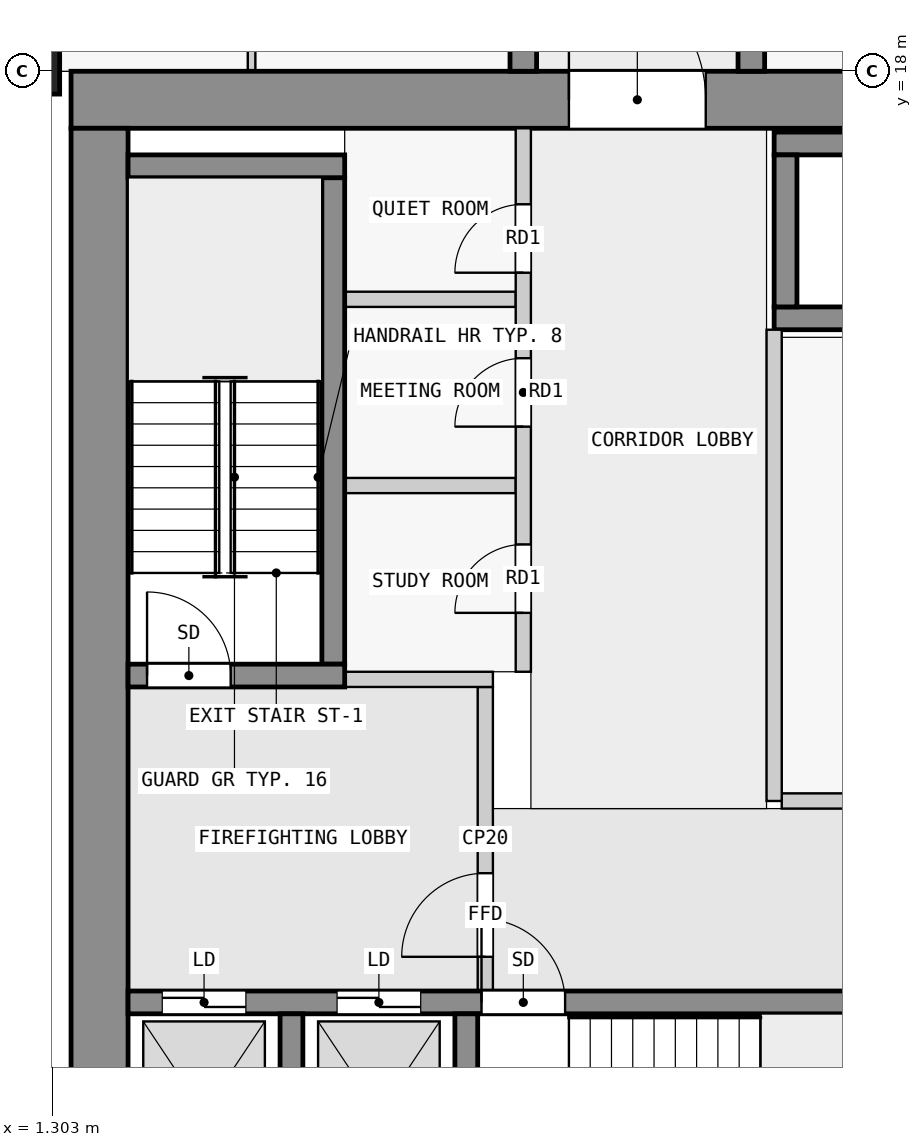
"""IFC4 building model, lengths in metres.
Left out: names, types, materials, properties, quantities, classifications, styles, units other than length and angle.
Written with IfcOpenShell. Run it as: python <this file> out.ifc"""

import sys

from ifc_helpers import new_model, si_unit, direction, frame, frame_2d, origin, origin_2d, place, context, subcontext, project, spatial, rectangle, extrude, element, fill, save


model = new_model("IFC4")
c1 = context("Model", 3, precision=1e-05, world=origin(), true_north=direction((0.0, 1.0)))
c2 = subcontext(c1, "Body", "Model", "MODEL_VIEW")
j1 = project(units=[si_unit("LENGTHUNIT", "METRE"), si_unit("PLANEANGLEUNIT", "RADIAN")], contexts=[c1])
p1 = place(None, origin())
s1 = spatial("IfcSite", under=j1, at=p1, CompositionType="ELEMENT")
p2 = place(p1, origin())
s2 = spatial("IfcBuilding", under=s1, at=p2, CompositionType="ELEMENT")
p3 = place(p2, frame((0.0, 0.0, 44.3)))
s3 = spatial("IfcBuildingStorey", under=s2, at=p3, CompositionType="ELEMENT", Elevation=44.3)
p4 = place(p3, frame((0.7, 18.0, 0.0), z_axis=(0.0, 0.0, 1.0), x_axis=(0.0, 1.0, 0.0)))
e1 = element("IfcColumn", 1, at=p4, inside=s3, PredefinedType="COLUMN", context=c2, shape_type="SweptSolid", body=[
    extrude(rectangle(XDim=0.6, YDim=1.4, at=origin_2d()), origin(), (0.0, 0.0, 1.0), 3.5),
])
p5 = place(p3, frame((1.55, 17.625, 0.0), z_axis=(0.0, 0.0, 1.0), x_axis=(1.0, 0.0, 0.0)))
e2 = element("IfcWall", 2, at=p5, inside=s3, PredefinedType="SHEAR", context=c2, shape_type="SweptSolid", body=[
    extrude(rectangle(XDim=20.95, YDim=0.75, at=frame_2d((10.475, 0.0))), origin(), (0.0, 0.0, 1.0), 3.25),
])
p6 = place(p5, frame((6.55, 0.0, 0.0)))
e3 = element("IfcOpeningElement", 3, at=p6, cuts=e2, PredefinedType="OPENING", context=c2, shape_type="SweptSolid", body=[
    extrude(rectangle(XDim=1.8, YDim=2.1, at=frame_2d((0.9, 1.05))), frame((0.0, 0.385, 0.0), z_axis=(0.0, -1.0, 0.0), x_axis=(1.0, 0.0, 0.0)), (0.0, 0.0, 1.0), 0.77),
])
p7 = place(p3, frame((1.925, 2.5, 0.0), z_axis=(0.0, 0.0, 1.0), x_axis=(0.0, 1.0, 0.0)))
e4 = element("IfcWall", 4, at=p7, inside=s3, PredefinedType="SHEAR", context=c2, shape_type="SweptSolid", body=[
    extrude(rectangle(XDim=14.75, YDim=0.75, at=frame_2d((7.375, 0.0))), origin(), (0.0, 0.0, 1.0), 3.25),
])
for number, where, z_axis, x_axis in (
    (5, (4.45, 2.8, 0.0), (0.0, 0.0, 1.0), (0.0, 1.0, 0.0)),
    (6, (6.75, 2.8, 0.0), (0.0, 0.0, 1.0), (0.0, 1.0, 0.0)),
):
    element("IfcWall", number, at=place(p3, frame(where, z_axis=z_axis, x_axis=x_axis)), inside=s3, PredefinedType="SHEAR", context=c2, shape_type="SweptSolid", body=[
        extrude(rectangle(XDim=2.8, YDim=0.3, at=frame_2d((1.4, 0.0))), origin(), (0.0, 0.0, 1.0), 3.25),
    ])
p8 = place(p3, frame((2.3, 5.75, 0.0), z_axis=(0.0, 0.0, 1.0), x_axis=(1.0, 0.0, 0.0)))
e7 = element("IfcWall", 7, at=p8, inside=s3, PredefinedType="SHEAR", context=c2, shape_type="SweptSolid", body=[
    extrude(rectangle(XDim=18.8, YDim=0.3, at=frame_2d((9.4, 0.0))), origin(), (0.0, 0.0, 1.0), 3.25),
])
p9 = place(p8, frame((4.65, 0.0, 0.0)))
e8 = element("IfcOpeningElement", 8, at=p9, cuts=e7, PredefinedType="OPENING", context=c2, shape_type="SweptSolid", body=[
    extrude(rectangle(XDim=1.1, YDim=2.1, at=frame_2d((0.55, 1.05))), frame((0.0, 0.16, 0.0), z_axis=(0.0, -1.0, 0.0), x_axis=(1.0, 0.0, 0.0)), (0.0, 0.0, 1.0), 0.32),
])
p10 = place(p8, frame((0.45, 0.0, 0.0)))
e9 = element("IfcOpeningElement", 9, at=p10, cuts=e7, PredefinedType="OPENING", context=c2, shape_type="SweptSolid", body=[
    extrude(rectangle(XDim=1.1, YDim=2.1, at=frame_2d((0.55, 1.05))), frame((0.0, 0.16, 0.0), z_axis=(0.0, -1.0, 0.0), x_axis=(1.0, 0.0, 0.0)), (0.0, 0.0, 1.0), 0.32),
])
p11 = place(p8, frame((2.75, 0.0, 0.0)))
e10 = element("IfcOpeningElement", 10, at=p11, cuts=e7, PredefinedType="OPENING", context=c2, shape_type="SweptSolid", body=[
    extrude(rectangle(XDim=1.1, YDim=2.1, at=frame_2d((0.55, 1.05))), frame((0.0, 0.16, 0.0), z_axis=(0.0, -1.0, 0.0), x_axis=(1.0, 0.0, 0.0)), (0.0, 0.0, 1.0), 0.32),
])
p12 = place(p8, frame((11.85, 0.0, 0.0)))
e11 = element("IfcOpeningElement", 11, at=p12, cuts=e7, PredefinedType="OPENING", context=c2, shape_type="SweptSolid", body=[
    extrude(rectangle(XDim=1.1, YDim=2.1, at=frame_2d((0.55, 1.05))), frame((0.0, 0.16, 0.0), z_axis=(0.0, -1.0, 0.0), x_axis=(1.0, 0.0, 0.0)), (0.0, 0.0, 1.0), 0.32),
])
p13 = place(p8, frame((14.35, 0.0, 0.0)))
e12 = element("IfcOpeningElement", 12, at=p13, cuts=e7, PredefinedType="OPENING", context=c2, shape_type="SweptSolid", body=[
    extrude(rectangle(XDim=1.1, YDim=2.1, at=frame_2d((0.55, 1.05))), frame((0.0, 0.16, 0.0), z_axis=(0.0, -1.0, 0.0), x_axis=(1.0, 0.0, 0.0)), (0.0, 0.0, 1.0), 0.32),
])
p14 = place(p8, frame((16.85, 0.0, 0.0)))
e13 = element("IfcOpeningElement", 13, at=p14, cuts=e7, PredefinedType="OPENING", context=c2, shape_type="SweptSolid", body=[
    extrude(rectangle(XDim=1.1, YDim=2.1, at=frame_2d((0.55, 1.05))), frame((0.0, 0.16, 0.0), z_axis=(0.0, -1.0, 0.0), x_axis=(1.0, 0.0, 0.0)), (0.0, 0.0, 1.0), 0.32),
])
p15 = place(p3, frame((2.3, 10.05, 0.0), z_axis=(0.0, 0.0, 1.0), x_axis=(1.0, 0.0, 0.0)))
e14 = element("IfcWall", 14, at=p15, inside=s3, PredefinedType="SHEAR", context=c2, shape_type="SweptSolid", body=[
    extrude(rectangle(XDim=2.85, YDim=0.3, at=frame_2d((1.425, 0.0))), origin(), (0.0, 0.0, 1.0), 3.25),
])
p16 = place(p15, frame((0.25, 0.0, 0.0)))
e15 = element("IfcOpeningElement", 15, at=p16, cuts=e14, PredefinedType="OPENING", context=c2, shape_type="SweptSolid", body=[
    extrude(rectangle(XDim=1.1, YDim=2.1, at=frame_2d((0.55, 1.05))), frame((0.0, 0.16, 0.0), z_axis=(0.0, -1.0, 0.0), x_axis=(1.0, 0.0, 0.0)), (0.0, 0.0, 1.0), 0.32),
])
p17 = place(p3, frame((5.0, 10.2, 0.0), z_axis=(0.0, 0.0, 1.0), x_axis=(0.0, 1.0, 0.0)))
e16 = element("IfcWall", 16, at=p17, inside=s3, PredefinedType="SHEAR", context=c2, shape_type="SweptSolid", body=[
    extrude(rectangle(XDim=6.4, YDim=0.3, at=frame_2d((3.2, 0.0))), origin(), (0.0, 0.0, 1.0), 3.25),
])
p18 = place(p3, frame((2.3, 16.75, 0.0), z_axis=(0.0, 0.0, 1.0), x_axis=(1.0, 0.0, 0.0)))
e17 = element("IfcWall", 17, at=p18, inside=s3, PredefinedType="SHEAR", context=c2, shape_type="SweptSolid", body=[
    extrude(rectangle(XDim=2.85, YDim=0.3, at=frame_2d((1.425, 0.0))), origin(), (0.0, 0.0, 1.0), 3.25),
])
for number, where, z_axis, x_axis in (
    (18, (10.8, 17.05, 0.0), (0.0, 0.0, 1.0), (1.0, 0.0, 0.0)),
    (19, (10.8, 14.75, 0.0), (0.0, 0.0, 1.0), (1.0, 0.0, 0.0)),
):
    element("IfcWall", number, at=place(p3, frame(where, z_axis=z_axis, x_axis=x_axis)), inside=s3, PredefinedType="SHEAR", context=c2, shape_type="SweptSolid", body=[
        extrude(rectangle(XDim=7.8, YDim=0.3, at=frame_2d((3.9, 0.0))), origin(), (0.0, 0.0, 1.0), 3.25),
    ])
p19 = place(p3, frame((10.95, 14.9, 0.0), z_axis=(0.0, 0.0, 1.0), x_axis=(0.0, 1.0, 0.0)))
e20 = element("IfcWall", 20, at=p19, inside=s3, PredefinedType="SHEAR", context=c2, shape_type="SweptSolid", body=[
    extrude(rectangle(XDim=2.0, YDim=0.3, at=frame_2d((1.0, 0.0))), origin(), (0.0, 0.0, 1.0), 3.25),
])
p20 = place(p3, frame((7.5, 18.0, 0.0), z_axis=(0.0, 0.0, 1.0), x_axis=(0.0, 1.0, 0.0)))
e21 = element("IfcWall", 21, at=p20, inside=s3, PredefinedType="SHEAR", context=c2, shape_type="SweptSolid", body=[
    extrude(rectangle(XDim=27.0, YDim=0.35, at=frame_2d((13.5, 0.0))), origin(), (0.0, 0.0, 1.0), 3.25),
])
p21 = place(p20, frame((4.75, 0.0, 0.0)))
e22 = element("IfcOpeningElement", 22, at=p21, cuts=e21, PredefinedType="OPENING", context=c2, shape_type="SweptSolid", body=[
    extrude(rectangle(XDim=1.0, YDim=2.1, at=frame_2d((0.5, 1.05))), frame((0.0, 0.185, 0.0), z_axis=(0.0, -1.0, 0.0), x_axis=(1.0, 0.0, 0.0)), (0.0, 0.0, 1.0), 0.37),
])
p22 = place(p20, frame((15.25, 0.0, 0.0)))
e23 = element("IfcOpeningElement", 23, at=p22, cuts=e21, PredefinedType="OPENING", context=c2, shape_type="SweptSolid", body=[
    extrude(rectangle(XDim=1.0, YDim=2.1, at=frame_2d((0.5, 1.05))), frame((0.0, 0.185, 0.0), z_axis=(0.0, -1.0, 0.0), x_axis=(1.0, 0.0, 0.0)), (0.0, 0.0, 1.0), 0.37),
])
p23 = place(p20, frame((19.75, 0.0, 0.0)))
e24 = element("IfcOpeningElement", 24, at=p23, cuts=e21, PredefinedType="OPENING", context=c2, shape_type="SweptSolid", body=[
    extrude(rectangle(XDim=1.0, YDim=2.1, at=frame_2d((0.5, 1.05))), frame((0.0, 0.185, 0.0), z_axis=(0.0, -1.0, 0.0), x_axis=(1.0, 0.0, 0.0)), (0.0, 0.0, 1.0), 0.37),
])
p24 = place(p20, frame((23.25, 0.0, 0.0)))
e25 = element("IfcOpeningElement", 25, at=p24, cuts=e21, PredefinedType="OPENING", context=c2, shape_type="SweptSolid", body=[
    extrude(rectangle(XDim=0.9, YDim=2.1, at=frame_2d((0.45, 1.05))), frame((0.0, 0.185, 0.0), z_axis=(0.0, -1.0, 0.0), x_axis=(1.0, 0.0, 0.0)), (0.0, 0.0, 1.0), 0.37),
])
p25 = place(p20, frame((25.45, 0.0, 0.0)))
e26 = element("IfcOpeningElement", 26, at=p25, cuts=e21, PredefinedType="OPENING", context=c2, shape_type="SweptSolid", body=[
    extrude(rectangle(XDim=1.0, YDim=2.1, at=frame_2d((0.5, 1.05))), frame((0.0, 0.185, 0.0), z_axis=(0.0, -1.0, 0.0), x_axis=(1.0, 0.0, 0.0)), (0.0, 0.0, 1.0), 0.37),
])
p26 = place(p3, frame((10.5, 18.0, 0.0), z_axis=(0.0, 0.0, 1.0), x_axis=(0.0, 1.0, 0.0)))
e27 = element("IfcWall", 27, at=p26, inside=s3, PredefinedType="SHEAR", context=c2, shape_type="SweptSolid", body=[
    extrude(rectangle(XDim=27.0, YDim=0.35, at=frame_2d((13.5, 0.0))), origin(), (0.0, 0.0, 1.0), 3.25),
])
p27 = place(p26, frame((1.75, 0.0, 0.0)))
e28 = element("IfcOpeningElement", 28, at=p27, cuts=e27, PredefinedType="OPENING", context=c2, shape_type="SweptSolid", body=[
    extrude(rectangle(XDim=1.0, YDim=2.1, at=frame_2d((0.5, 1.05))), frame((0.0, 0.185, 0.0), z_axis=(0.0, -1.0, 0.0), x_axis=(1.0, 0.0, 0.0)), (0.0, 0.0, 1.0), 0.37),
])
p28 = place(p26, frame((6.25, 0.0, 0.0)))
e29 = element("IfcOpeningElement", 29, at=p28, cuts=e27, PredefinedType="OPENING", context=c2, shape_type="SweptSolid", body=[
    extrude(rectangle(XDim=1.0, YDim=2.1, at=frame_2d((0.5, 1.05))), frame((0.0, 0.185, 0.0), z_axis=(0.0, -1.0, 0.0), x_axis=(1.0, 0.0, 0.0)), (0.0, 0.0, 1.0), 0.37),
])
p29 = place(p26, frame((10.75, 0.0, 0.0)))
e30 = element("IfcOpeningElement", 30, at=p29, cuts=e27, PredefinedType="OPENING", context=c2, shape_type="SweptSolid", body=[
    extrude(rectangle(XDim=1.0, YDim=2.1, at=frame_2d((0.5, 1.05))), frame((0.0, 0.185, 0.0), z_axis=(0.0, -1.0, 0.0), x_axis=(1.0, 0.0, 0.0)), (0.0, 0.0, 1.0), 0.37),
])
p30 = place(p26, frame((15.25, 0.0, 0.0)))
e31 = element("IfcOpeningElement", 31, at=p30, cuts=e27, PredefinedType="OPENING", context=c2, shape_type="SweptSolid", body=[
    extrude(rectangle(XDim=1.0, YDim=2.1, at=frame_2d((0.5, 1.05))), frame((0.0, 0.185, 0.0), z_axis=(0.0, -1.0, 0.0), x_axis=(1.0, 0.0, 0.0)), (0.0, 0.0, 1.0), 0.37),
])
p31 = place(p26, frame((21.35, 0.0, 0.0)))
e32 = element("IfcOpeningElement", 32, at=p31, cuts=e27, PredefinedType="OPENING", context=c2, shape_type="SweptSolid", body=[
    extrude(rectangle(XDim=1.0, YDim=2.1, at=frame_2d((0.5, 1.05))), frame((0.0, 0.185, 0.0), z_axis=(0.0, -1.0, 0.0), x_axis=(1.0, 0.0, 0.0)), (0.0, 0.0, 1.0), 0.37),
])
p32 = place(p3, frame((7.0, 5.9, 0.0), z_axis=(0.0, 0.0, 1.0), x_axis=(0.0, 1.0, 0.0)))
e33 = element("IfcWall", 33, at=p32, inside=s3, PredefinedType="PARTITIONING", context=c2, shape_type="SweptSolid", body=[
    extrude(rectangle(XDim=4.0, YDim=0.2, at=frame_2d((2.0, 0.0))), origin(), (0.0, 0.0, 1.0), 3.25),
])
p33 = place(p32, frame((0.45, 0.0, 0.0)))
e34 = element("IfcOpeningElement", 34, at=p33, cuts=e33, PredefinedType="OPENING", context=c2, shape_type="SweptSolid", body=[
    extrude(rectangle(XDim=1.1, YDim=2.1, at=frame_2d((0.55, 1.05))), frame((0.0, 0.11, 0.0), z_axis=(0.0, -1.0, 0.0), x_axis=(1.0, 0.0, 0.0)), (0.0, 0.0, 1.0), 0.22),
])
p34 = place(p3, frame((5.15, 10.0, 0.0), z_axis=(0.0, 0.0, 1.0), x_axis=(1.0, 0.0, 0.0)))
e35 = element("IfcWall", 35, at=p34, inside=s3, PredefinedType="PARTITIONING", context=c2, shape_type="SweptSolid", body=[
    extrude(rectangle(XDim=1.95, YDim=0.2, at=frame_2d((0.975, 0.0))), origin(), (0.0, 0.0, 1.0), 3.25),
])
p35 = place(p3, frame((10.8, 8.4, 0.0), z_axis=(0.0, 0.0, 1.0), x_axis=(0.0, 1.0, 0.0)))
e36 = element("IfcWall", 36, at=p35, inside=s3, PredefinedType="PARTITIONING", context=c2, shape_type="SweptSolid", body=[
    extrude(rectangle(XDim=6.2, YDim=0.2, at=frame_2d((3.1, 0.0))), origin(), (0.0, 0.0, 1.0), 3.25),
])
p36 = place(p3, frame((10.9, 8.4, 0.0), z_axis=(0.0, 0.0, 1.0), x_axis=(1.0, 0.0, 0.0)))
e37 = element("IfcWall", 37, at=p36, inside=s3, PredefinedType="PARTITIONING", context=c2, shape_type="SweptSolid", body=[
    extrude(rectangle(XDim=7.4, YDim=0.2, at=frame_2d((3.7, 0.0))), origin(), (0.0, 0.0, 1.0), 3.25),
])
p37 = place(p3, frame((7.5, 10.1, 0.0), z_axis=(0.0, 0.0, 1.0), x_axis=(0.0, 1.0, 0.0)))
e38 = element("IfcWall", 38, at=p37, inside=s3, PredefinedType="PARTITIONING", context=c2, shape_type="SweptSolid", body=[
    extrude(rectangle(XDim=7.15, YDim=0.2, at=frame_2d((3.575, 0.0))), origin(), (0.0, 0.0, 1.0), 3.25),
])
p38 = place(p37, frame((0.775, 0.0, 0.0)))
e39 = element("IfcOpeningElement", 39, at=p38, cuts=e38, PredefinedType="OPENING", context=c2, shape_type="SweptSolid", body=[
    extrude(rectangle(XDim=0.9, YDim=2.1, at=frame_2d((0.45, 1.05))), frame((0.0, 0.11, 0.0), z_axis=(0.0, -1.0, 0.0), x_axis=(1.0, 0.0, 0.0)), (0.0, 0.0, 1.0), 0.22),
])
p39 = place(p37, frame((3.225, 0.0, 0.0)))
e40 = element("IfcOpeningElement", 40, at=p39, cuts=e38, PredefinedType="OPENING", context=c2, shape_type="SweptSolid", body=[
    extrude(rectangle(XDim=0.9, YDim=2.1, at=frame_2d((0.45, 1.05))), frame((0.0, 0.11, 0.0), z_axis=(0.0, -1.0, 0.0), x_axis=(1.0, 0.0, 0.0)), (0.0, 0.0, 1.0), 0.22),
])
p40 = place(p37, frame((5.25, 0.0, 0.0)))
e41 = element("IfcOpeningElement", 41, at=p40, cuts=e38, PredefinedType="OPENING", context=c2, shape_type="SweptSolid", body=[
    extrude(rectangle(XDim=0.9, YDim=2.1, at=frame_2d((0.45, 1.05))), frame((0.0, 0.11, 0.0), z_axis=(0.0, -1.0, 0.0), x_axis=(1.0, 0.0, 0.0)), (0.0, 0.0, 1.0), 0.22),
])
for number, where, z_axis, x_axis in (
    (42, (5.15, 12.55, 0.0), (0.0, 0.0, 1.0), (1.0, 0.0, 0.0)),
    (43, (5.15, 15.0, 0.0), (0.0, 0.0, 1.0), (1.0, 0.0, 0.0)),
):
    element("IfcWall", number, at=place(p3, frame(where, z_axis=z_axis, x_axis=x_axis)), inside=s3, PredefinedType="PARTITIONING", context=c2, shape_type="SweptSolid", body=[
        extrude(rectangle(XDim=2.25, YDim=0.2, at=frame_2d((1.125, 0.0))), origin(), (0.0, 0.0, 1.0), 3.25),
    ])
p41 = place(p3, frame((3.925, 18.0, 0.0), z_axis=(0.0, 0.0, 1.0), x_axis=(0.0, 1.0, 0.0)))
e44 = element("IfcWall", 44, at=p41, inside=s3, PredefinedType="PARTITIONING", context=c2, shape_type="SweptSolid", body=[
    extrude(rectangle(XDim=9.0, YDim=0.1, at=frame_2d((4.5, 0.0))), origin(), (0.0, 0.0, 1.0), 3.25),
])
p42 = place(p41, frame((1.85, 0.0, 0.0)))
e45 = element("IfcOpeningElement", 45, at=p42, cuts=e44, PredefinedType="OPENING", context=c2, shape_type="SweptSolid", body=[
    extrude(rectangle(XDim=0.9, YDim=2.1, at=frame_2d((0.45, 1.05))), frame((0.0, 0.06, 0.0), z_axis=(0.0, -1.0, 0.0), x_axis=(1.0, 0.0, 0.0)), (0.0, 0.0, 1.0), 0.12),
])
p43 = place(p41, frame((6.25, 0.0, 0.0)))
e46 = element("IfcOpeningElement", 46, at=p43, cuts=e44, PredefinedType="OPENING", context=c2, shape_type="SweptSolid", body=[
    extrude(rectangle(XDim=0.9, YDim=2.1, at=frame_2d((0.45, 1.05))), frame((0.0, 0.06, 0.0), z_axis=(0.0, -1.0, 0.0), x_axis=(1.0, 0.0, 0.0)), (0.0, 0.0, 1.0), 0.12),
])
p44 = place(p33, origin())
e47 = element("IfcDoor", 47, at=p44, inside=s3, OperationType="SINGLE_SWING_LEFT", PredefinedType="DOOR", context=c2, shape_type="SweptSolid", body=[
    extrude(rectangle(XDim=1.1, YDim=2.1, at=frame_2d((0.55, 1.05))), frame((0.0, 0.025, 0.0), z_axis=(0.0, -1.0, 0.0), x_axis=(1.0, 0.0, 0.0)), (0.0, 0.0, 1.0), 0.05),
])
fill(e34, e47)
p45 = place(p16, origin())
e48 = element("IfcDoor", 48, at=p45, inside=s3, OperationType="SINGLE_SWING_RIGHT", PredefinedType="DOOR", context=c2, shape_type="SweptSolid", body=[
    extrude(rectangle(XDim=1.1, YDim=2.1, at=frame_2d((0.55, 1.05))), frame((0.0, 0.025, 0.0), z_axis=(0.0, -1.0, 0.0), x_axis=(1.0, 0.0, 0.0)), (0.0, 0.0, 1.0), 0.05),
])
fill(e15, e48)
p46 = place(p9, origin())
e49 = element("IfcDoor", 49, at=p46, inside=s3, OperationType="SINGLE_SWING_LEFT", PredefinedType="DOOR", context=c2, shape_type="SweptSolid", body=[
    extrude(rectangle(XDim=1.1, YDim=2.1, at=frame_2d((0.55, 1.05))), frame((0.0, 0.025, 0.0), z_axis=(0.0, -1.0, 0.0), x_axis=(1.0, 0.0, 0.0)), (0.0, 0.0, 1.0), 0.05),
])
fill(e8, e49)
p47 = place(p10, origin())
e50 = element("IfcDoor", 50, at=p47, inside=s3, OperationType="DOUBLE_DOOR_SLIDING", PredefinedType="DOOR", context=c2, shape_type="SweptSolid", body=[
    extrude(rectangle(XDim=1.1, YDim=2.1, at=frame_2d((0.55, 1.05))), frame((0.0, 0.025, 0.0), z_axis=(0.0, -1.0, 0.0), x_axis=(1.0, 0.0, 0.0)), (0.0, 0.0, 1.0), 0.05),
])
fill(e9, e50)
p48 = place(p11, origin())
e51 = element("IfcDoor", 51, at=p48, inside=s3, OperationType="DOUBLE_DOOR_SLIDING", PredefinedType="DOOR", context=c2, shape_type="SweptSolid", body=[
    extrude(rectangle(XDim=1.1, YDim=2.1, at=frame_2d((0.55, 1.05))), frame((0.0, 0.025, 0.0), z_axis=(0.0, -1.0, 0.0), x_axis=(1.0, 0.0, 0.0)), (0.0, 0.0, 1.0), 0.05),
])
fill(e10, e51)
p49 = place(p6, origin())
e52 = element("IfcDoor", 52, at=p49, inside=s3, OperationType="DOUBLE_DOOR_SINGLE_SWING", PredefinedType="DOOR", context=c2, shape_type="SweptSolid", body=[
    extrude(rectangle(XDim=1.8, YDim=2.1, at=frame_2d((0.9, 1.05))), frame((0.0, 0.025, 0.0), z_axis=(0.0, -1.0, 0.0), x_axis=(1.0, 0.0, 0.0)), (0.0, 0.0, 1.0), 0.05),
])
fill(e3, e52)
p50 = place(p38, origin())
e53 = element("IfcDoor", 53, at=p50, inside=s3, OperationType="SINGLE_SWING_RIGHT", PredefinedType="DOOR", context=c2, shape_type="SweptSolid", body=[
    extrude(rectangle(XDim=0.9, YDim=2.1, at=frame_2d((0.45, 1.05))), frame((0.0, 0.025, 0.0), z_axis=(0.0, -1.0, 0.0), x_axis=(1.0, 0.0, 0.0)), (0.0, 0.0, 1.0), 0.05),
])
fill(e39, e53)
p51 = place(p39, origin())
e54 = element("IfcDoor", 54, at=p51, inside=s3, OperationType="SINGLE_SWING_RIGHT", PredefinedType="DOOR", context=c2, shape_type="SweptSolid", body=[
    extrude(rectangle(XDim=0.9, YDim=2.1, at=frame_2d((0.45, 1.05))), frame((0.0, 0.025, 0.0), z_axis=(0.0, -1.0, 0.0), x_axis=(1.0, 0.0, 0.0)), (0.0, 0.0, 1.0), 0.05),
])
fill(e40, e54)
p52 = place(p40, origin())
e55 = element("IfcDoor", 55, at=p52, inside=s3, OperationType="SINGLE_SWING_RIGHT", PredefinedType="DOOR", context=c2, shape_type="SweptSolid", body=[
    extrude(rectangle(XDim=0.9, YDim=2.1, at=frame_2d((0.45, 1.05))), frame((0.0, 0.025, 0.0), z_axis=(0.0, -1.0, 0.0), x_axis=(1.0, 0.0, 0.0)), (0.0, 0.0, 1.0), 0.05),
])
fill(e41, e55)
save(model, sys.argv[1])
